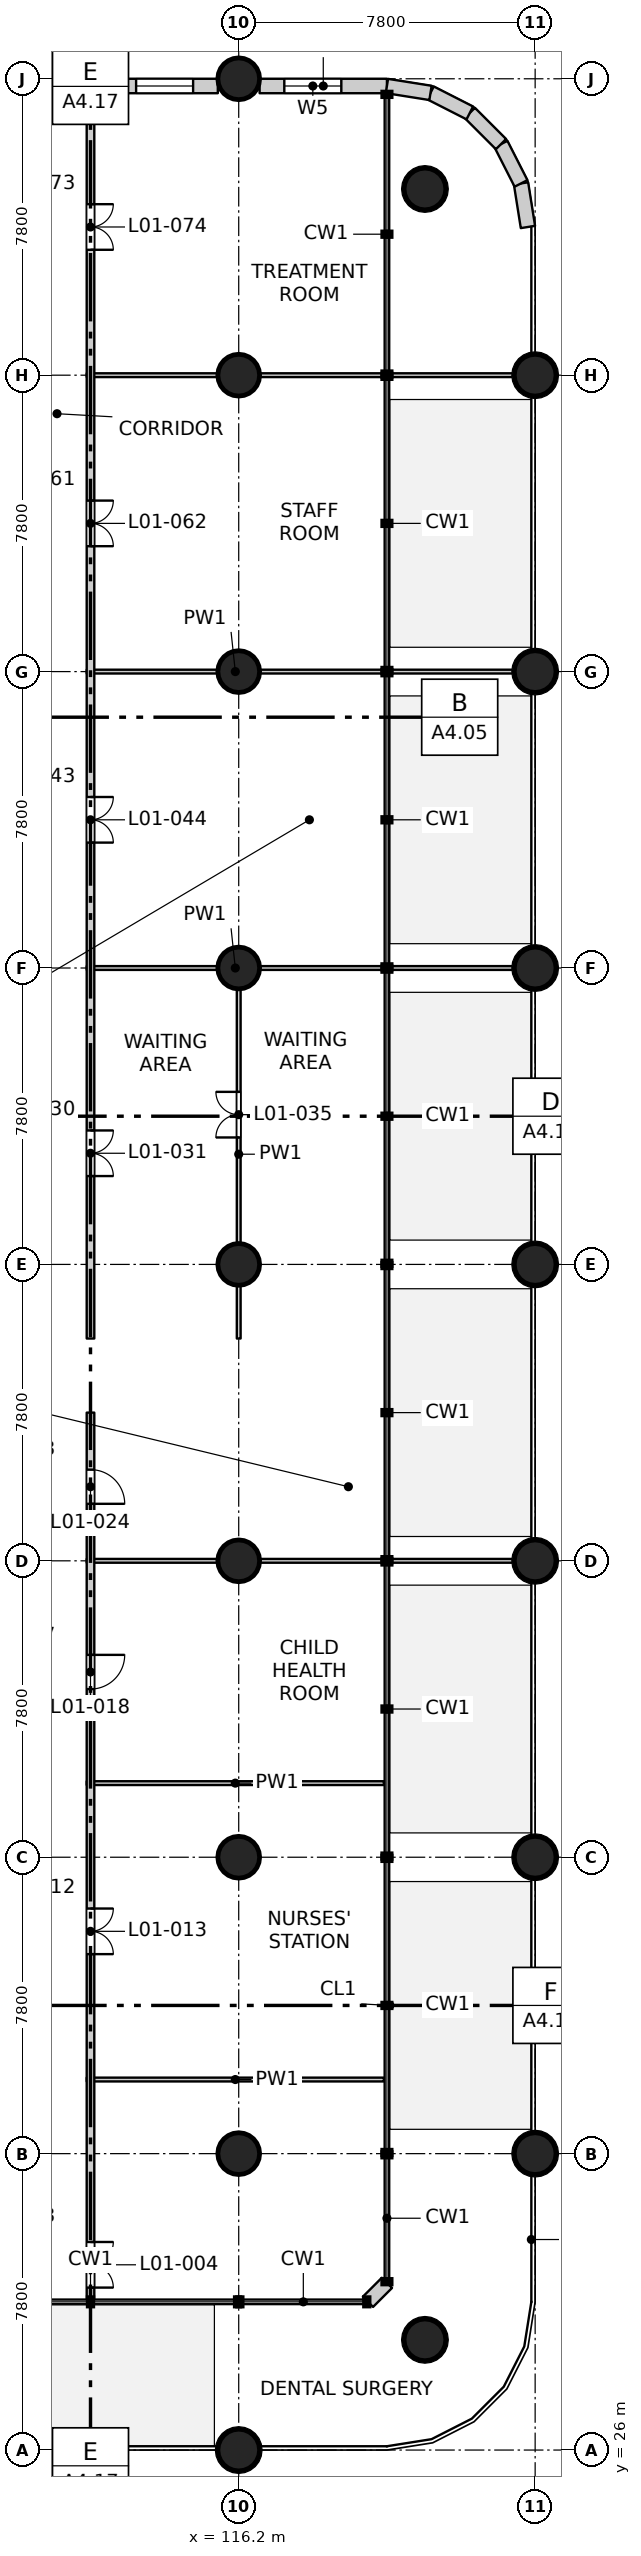
"""IFC4 building model, lengths in metres.
Left out: names, types, materials, properties, quantities, classifications, styles, units other than length and angle.
Written with IfcOpenShell. Run it as: python <this file> out.ifc"""

import sys

from ifc_helpers import new_model, si_unit, direction, frame, frame_2d, origin, origin_2d, place, context, subcontext, project, spatial, rectangle, circle, extrude, element, fill, save


model = new_model("IFC4")
c1 = context("Model", 3, precision=1e-05, world=origin(), true_north=direction((0.0, 1.0)))
c2 = subcontext(c1, "Body", "Model", "MODEL_VIEW")
j1 = project(units=[si_unit("LENGTHUNIT", "METRE"), si_unit("PLANEANGLEUNIT", "RADIAN")], contexts=[c1])
p1 = place(None, origin())
s1 = spatial("IfcSite", under=j1, at=p1, CompositionType="ELEMENT")
p2 = place(p1, origin())
s2 = spatial("IfcBuilding", under=s1, at=p2, CompositionType="ELEMENT")
p3 = place(p2, frame((0.0, 0.0, 6.0)))
s3 = spatial("IfcBuildingStorey", under=s2, at=p3, CompositionType="ELEMENT", Elevation=6.0)
for number, where, z_axis, x_axis in (
    (1, (116.2, 26.0, -0.3), (0.0, 0.0, 1.0), (1.0, 0.0, 0.0)),
    (2, (116.2, 33.8, -0.3), (0.0, 0.0, 1.0), (1.0, 0.0, 0.0)),
    (3, (116.2, 41.6, -0.3), (0.0, 0.0, 1.0), (1.0, 0.0, 0.0)),
    (4, (116.2, 49.4, -0.3), (0.0, 0.0, 1.0), (1.0, 0.0, 0.0)),
    (5, (116.2, 57.2, -0.3), (0.0, 0.0, 1.0), (1.0, 0.0, 0.0)),
    (6, (116.2, 65.0, -0.3), (0.0, 0.0, 1.0), (1.0, 0.0, 0.0)),
    (7, (116.2, 72.8, -0.3), (0.0, 0.0, 1.0), (1.0, 0.0, 0.0)),
    (8, (116.2, 80.6, -0.3), (0.0, 0.0, 1.0), (1.0, 0.0, 0.0)),
    (9, (116.2, 88.4, -0.3), (0.0, 0.0, 1.0), (1.0, 0.0, 0.0)),
    (10, (121.1, 28.9, -0.3), (0.0, 0.0, 1.0), (1.0, 0.0, 0.0)),
    (11, (124.0, 33.8, -0.3), (0.0, 0.0, 1.0), (1.0, 0.0, 0.0)),
    (12, (124.0, 41.6, -0.3), (0.0, 0.0, 1.0), (1.0, 0.0, 0.0)),
    (13, (124.0, 49.4, -0.3), (0.0, 0.0, 1.0), (1.0, 0.0, 0.0)),
    (14, (124.0, 57.2, -0.3), (0.0, 0.0, 1.0), (1.0, 0.0, 0.0)),
    (15, (124.0, 65.0, -0.3), (0.0, 0.0, 1.0), (1.0, 0.0, 0.0)),
    (16, (124.0, 72.8, -0.3), (0.0, 0.0, 1.0), (1.0, 0.0, 0.0)),
    (17, (124.0, 80.6, -0.3), (0.0, 0.0, 1.0), (1.0, 0.0, 0.0)),
    (18, (121.1, 85.5, -0.3), (0.0, 0.0, 1.0), (1.0, 0.0, 0.0)),
):
    element("IfcColumn", number, at=place(p3, frame(where, z_axis=z_axis, x_axis=x_axis)), inside=s3, PredefinedType="COLUMN", context=c2, shape_type="SweptSolid", body=[
        extrude(circle(Radius=0.55, at=origin_2d()), origin(), (0.0, 0.0, 1.0), 4.5),
    ])
p4 = place(p3, frame((119.6, 29.9, 0.0), z_axis=(0.0, 0.0, 1.0), x_axis=(0.707106781187, 0.707106781187, 0.0)))
e19 = element("IfcWall", 19, at=p4, inside=s3, PredefinedType="SOLIDWALL", context=c2, shape_type="SweptSolid", body=[
    extrude(rectangle(XDim=0.707, YDim=0.38, at=frame_2d((0.354, 0.0))), origin(), (0.0, 0.0, 1.0), 4.2),
])
p5 = place(p3, frame((101.2, 88.21, 0.0), z_axis=(0.0, 0.0, 1.0), x_axis=(1.0, 0.0, 0.0)))
e20 = element("IfcWall", 20, at=p5, inside=s3, PredefinedType="SOLIDWALL", context=c2, shape_type="SweptSolid", body=[
    extrude(rectangle(XDim=14.45, YDim=0.38, at=frame_2d((7.225, 0.0))), origin(), (0.0, 0.0, 1.0), 4.2),
])
p6 = place(p5, frame((0.6, 0.0, 0.9)))
e21 = element("IfcOpeningElement", 21, at=p6, cuts=e20, PredefinedType="OPENING", context=c2, shape_type="SweptSolid", body=[
    extrude(rectangle(XDim=1.5, YDim=1.5, at=frame_2d((0.75, 0.75))), frame((0.0, 0.2, 0.0), z_axis=(0.0, -1.0, 0.0), x_axis=(1.0, 0.0, 0.0)), (0.0, 0.0, 1.0), 0.4),
])
p7 = place(p5, frame((4.5, 0.0, 0.9)))
e22 = element("IfcOpeningElement", 22, at=p7, cuts=e20, PredefinedType="OPENING", context=c2, shape_type="SweptSolid", body=[
    extrude(rectangle(XDim=1.5, YDim=1.5, at=frame_2d((0.75, 0.75))), frame((0.0, 0.2, 0.0), z_axis=(0.0, -1.0, 0.0), x_axis=(1.0, 0.0, 0.0)), (0.0, 0.0, 1.0), 0.4),
])
p8 = place(p5, frame((12.3, 0.0, 0.9)))
e23 = element("IfcOpeningElement", 23, at=p8, cuts=e20, PredefinedType="OPENING", context=c2, shape_type="SweptSolid", body=[
    extrude(rectangle(XDim=1.5, YDim=1.5, at=frame_2d((0.75, 0.75))), frame((0.0, 0.2, 0.0), z_axis=(0.0, -1.0, 0.0), x_axis=(1.0, 0.0, 0.0)), (0.0, 0.0, 1.0), 0.4),
])
p9 = place(p3, frame((116.75, 88.21, 0.0), z_axis=(0.0, 0.0, 1.0), x_axis=(1.0, 0.0, 0.0)))
e24 = element("IfcWall", 24, at=p9, inside=s3, PredefinedType="SOLIDWALL", context=c2, shape_type="SweptSolid", body=[
    extrude(rectangle(XDim=3.35, YDim=0.38, at=frame_2d((1.675, 0.0))), origin(), (0.0, 0.0, 1.0), 4.2),
])
p10 = place(p9, frame((0.65, 0.0, 0.9)))
e25 = element("IfcOpeningElement", 25, at=p10, cuts=e24, PredefinedType="OPENING", context=c2, shape_type="SweptSolid", body=[
    extrude(rectangle(XDim=1.5, YDim=1.5, at=frame_2d((0.75, 0.75))), frame((0.0, 0.2, 0.0), z_axis=(0.0, -1.0, 0.0), x_axis=(1.0, 0.0, 0.0)), (0.0, 0.0, 1.0), 0.4),
])
p11 = place(p3, frame((123.81, 84.5, 0.0), z_axis=(0.0, 0.0, 1.0), x_axis=(-0.156480971952, 0.987680973502, 0.0)))
e26 = element("IfcWall", 26, at=p11, inside=s3, PredefinedType="SOLIDWALL", context=c2, shape_type="SweptSolid", body=[
    extrude(rectangle(XDim=1.161, YDim=0.38, at=frame_2d((0.581, 0.0))), origin(), (0.0, 0.0, 1.0), 4.2),
])
p12 = place(p3, frame((123.628, 85.646, 0.0), z_axis=(0.0, 0.0, 1.0), x_axis=(-0.453932083539, 0.891036286317, 0.0)))
e27 = element("IfcWall", 27, at=p12, inside=s3, PredefinedType="SOLIDWALL", context=c2, shape_type="SweptSolid", body=[
    extrude(rectangle(XDim=1.161, YDim=0.38, at=frame_2d((0.58, 0.0))), origin(), (0.0, 0.0, 1.0), 4.2),
])
for number, where, z_axis, x_axis in (
    (28, (123.102, 86.681, 0.0), (0.0, 0.0, 1.0), (-0.707, 0.707, 0.0)),
    (29, (122.281, 87.501, 0.0), (0.0, 0.0, 1.0), (-0.891, 0.454, 0.0)),
):
    element("IfcWall", number, at=place(p3, frame(where, z_axis=z_axis, x_axis=x_axis)), inside=s3, PredefinedType="SOLIDWALL", context=c2, shape_type="SweptSolid", body=[
        extrude(rectangle(XDim=1.161, YDim=0.38, at=frame_2d((0.581, 0.0))), origin(), (0.0, 0.0, 1.0), 4.2),
    ])
p13 = place(p3, frame((121.246, 88.028, 0.0), z_axis=(0.0, 0.0, 1.0), x_axis=(-0.987675821844, 0.156513484867, 0.0)))
e30 = element("IfcWall", 30, at=p13, inside=s3, PredefinedType="SOLIDWALL", context=c2, shape_type="SweptSolid", body=[
    extrude(rectangle(XDim=1.161, YDim=0.38, at=frame_2d((0.58, 0.0))), origin(), (0.0, 0.0, 1.0), 4.2),
])
p14 = place(p3, frame((112.2, 35.75, 0.0), z_axis=(0.0, 0.0, 1.0), x_axis=(1.0, 0.0, 0.0)))
e31 = element("IfcWall", 31, at=p14, inside=s3, PredefinedType="PARTITIONING", context=c2, shape_type="SweptSolid", body=[
    extrude(rectangle(XDim=7.82, YDim=0.1, at=frame_2d((3.91, 0.0))), origin(), (0.0, 0.0, 1.0), 4.2),
])
p15 = place(p3, frame((120.18, 35.75, 0.0), z_axis=(0.0, 0.0, 1.0), x_axis=(1.0, 0.0, 0.0)))
e32 = element("IfcWall", 32, at=p15, inside=s3, PredefinedType="PARTITIONING", context=c2, shape_type="SweptSolid", body=[
    extrude(rectangle(XDim=3.52, YDim=0.1, at=frame_2d((1.76, 0.0))), origin(), (0.0, 0.0, 1.0), 4.2),
])
p16 = place(p3, frame((112.2, 43.55, 0.0), z_axis=(0.0, 0.0, 1.0), x_axis=(1.0, 0.0, 0.0)))
e33 = element("IfcWall", 33, at=p16, inside=s3, PredefinedType="PARTITIONING", context=c2, shape_type="SweptSolid", body=[
    extrude(rectangle(XDim=7.82, YDim=0.1, at=frame_2d((3.91, 0.0))), origin(), (0.0, 0.0, 1.0), 4.2),
])
p17 = place(p3, frame((120.18, 43.55, 0.0), z_axis=(0.0, 0.0, 1.0), x_axis=(1.0, 0.0, 0.0)))
e34 = element("IfcWall", 34, at=p17, inside=s3, PredefinedType="PARTITIONING", context=c2, shape_type="SweptSolid", body=[
    extrude(rectangle(XDim=3.52, YDim=0.1, at=frame_2d((1.76, 0.0))), origin(), (0.0, 0.0, 1.0), 4.2),
])
p18 = place(p3, frame((112.2, 49.4, 0.0), z_axis=(0.0, 0.0, 1.0), x_axis=(1.0, 0.0, 0.0)))
e35 = element("IfcWall", 35, at=p18, inside=s3, PredefinedType="PARTITIONING", context=c2, shape_type="SweptSolid", body=[
    extrude(rectangle(XDim=7.82, YDim=0.1, at=frame_2d((3.91, 0.0))), origin(), (0.0, 0.0, 1.0), 4.2),
])
p19 = place(p3, frame((120.18, 49.4, 0.0), z_axis=(0.0, 0.0, 1.0), x_axis=(1.0, 0.0, 0.0)))
e36 = element("IfcWall", 36, at=p19, inside=s3, PredefinedType="PARTITIONING", context=c2, shape_type="SweptSolid", body=[
    extrude(rectangle(XDim=3.52, YDim=0.1, at=frame_2d((1.76, 0.0))), origin(), (0.0, 0.0, 1.0), 4.2),
])
p20 = place(p3, frame((112.2, 65.0, 0.0), z_axis=(0.0, 0.0, 1.0), x_axis=(1.0, 0.0, 0.0)))
e37 = element("IfcWall", 37, at=p20, inside=s3, PredefinedType="PARTITIONING", context=c2, shape_type="SweptSolid", body=[
    extrude(rectangle(XDim=7.82, YDim=0.1, at=frame_2d((3.91, 0.0))), origin(), (0.0, 0.0, 1.0), 4.2),
])
p21 = place(p3, frame((120.18, 65.0, 0.0), z_axis=(0.0, 0.0, 1.0), x_axis=(1.0, 0.0, 0.0)))
e38 = element("IfcWall", 38, at=p21, inside=s3, PredefinedType="PARTITIONING", context=c2, shape_type="SweptSolid", body=[
    extrude(rectangle(XDim=3.52, YDim=0.1, at=frame_2d((1.76, 0.0))), origin(), (0.0, 0.0, 1.0), 4.2),
])
p22 = place(p3, frame((112.2, 72.8, 0.0), z_axis=(0.0, 0.0, 1.0), x_axis=(1.0, 0.0, 0.0)))
e39 = element("IfcWall", 39, at=p22, inside=s3, PredefinedType="PARTITIONING", context=c2, shape_type="SweptSolid", body=[
    extrude(rectangle(XDim=7.82, YDim=0.1, at=frame_2d((3.91, 0.0))), origin(), (0.0, 0.0, 1.0), 4.2),
])
p23 = place(p3, frame((120.18, 72.8, 0.0), z_axis=(0.0, 0.0, 1.0), x_axis=(1.0, 0.0, 0.0)))
e40 = element("IfcWall", 40, at=p23, inside=s3, PredefinedType="PARTITIONING", context=c2, shape_type="SweptSolid", body=[
    extrude(rectangle(XDim=3.52, YDim=0.1, at=frame_2d((1.76, 0.0))), origin(), (0.0, 0.0, 1.0), 4.2),
])
p24 = place(p3, frame((112.2, 80.6, 0.0), z_axis=(0.0, 0.0, 1.0), x_axis=(1.0, 0.0, 0.0)))
e41 = element("IfcWall", 41, at=p24, inside=s3, PredefinedType="PARTITIONING", context=c2, shape_type="SweptSolid", body=[
    extrude(rectangle(XDim=7.82, YDim=0.1, at=frame_2d((3.91, 0.0))), origin(), (0.0, 0.0, 1.0), 4.2),
])
p25 = place(p3, frame((120.18, 80.6, 0.0), z_axis=(0.0, 0.0, 1.0), x_axis=(1.0, 0.0, 0.0)))
e42 = element("IfcWall", 42, at=p25, inside=s3, PredefinedType="PARTITIONING", context=c2, shape_type="SweptSolid", body=[
    extrude(rectangle(XDim=3.52, YDim=0.1, at=frame_2d((1.76, 0.0))), origin(), (0.0, 0.0, 1.0), 4.2),
])
p26 = place(p3, frame((112.3, 26.3, 0.0), z_axis=(0.0, 0.0, 1.0), x_axis=(0.0, 1.0, 0.0)))
e43 = element("IfcWall", 43, at=p26, inside=s3, PredefinedType="PARTITIONING", context=c2, shape_type="SweptSolid", body=[
    extrude(rectangle(XDim=3.52, YDim=0.2, at=frame_2d((1.76, 0.0))), origin(), (0.0, 0.0, 1.0), 4.2),
])
p27 = place(p3, frame((112.3, 29.98, 0.0), z_axis=(0.0, 0.0, 1.0), x_axis=(0.0, 1.0, 0.0)))
e44 = element("IfcWall", 44, at=p27, inside=s3, PredefinedType="PARTITIONING", context=c2, shape_type="SweptSolid", body=[
    extrude(rectangle(XDim=23.32, YDim=0.2, at=frame_2d((11.66, 0.0))), origin(), (0.0, 0.0, 1.0), 4.2),
])
p28 = place(p27, frame((0.295, 0.0, 0.0)))
e45 = element("IfcOpeningElement", 45, at=p28, cuts=e44, PredefinedType="OPENING", context=c2, shape_type="SweptSolid", body=[
    extrude(rectangle(XDim=1.2, YDim=2.1, at=frame_2d((0.6, 1.05))), frame((0.0, 0.11, 0.0), z_axis=(0.0, -1.0, 0.0), x_axis=(1.0, 0.0, 0.0)), (0.0, 0.0, 1.0), 0.22),
])
p29 = place(p27, frame((9.07, 0.0, 0.0)))
e46 = element("IfcOpeningElement", 46, at=p29, cuts=e44, PredefinedType="OPENING", context=c2, shape_type="SweptSolid", body=[
    extrude(rectangle(XDim=1.2, YDim=2.1, at=frame_2d((0.6, 1.05))), frame((0.0, 0.11, 0.0), z_axis=(0.0, -1.0, 0.0), x_axis=(1.0, 0.0, 0.0)), (0.0, 0.0, 1.0), 0.22),
])
p30 = place(p27, frame((16.045, 0.0, 0.0)))
e47 = element("IfcOpeningElement", 47, at=p30, cuts=e44, PredefinedType="OPENING", context=c2, shape_type="SweptSolid", body=[
    extrude(rectangle(XDim=0.9, YDim=2.1, at=frame_2d((0.45, 1.05))), frame((0.0, 0.11, 0.0), z_axis=(0.0, -1.0, 0.0), x_axis=(1.0, 0.0, 0.0)), (0.0, 0.0, 1.0), 0.22),
])
p31 = place(p27, frame((20.92, 0.0, 0.0)))
e48 = element("IfcOpeningElement", 48, at=p31, cuts=e44, PredefinedType="OPENING", context=c2, shape_type="SweptSolid", body=[
    extrude(rectangle(XDim=0.9, YDim=2.1, at=frame_2d((0.45, 1.05))), frame((0.0, 0.11, 0.0), z_axis=(0.0, -1.0, 0.0), x_axis=(1.0, 0.0, 0.0)), (0.0, 0.0, 1.0), 0.22),
])
p32 = place(p3, frame((112.3, 55.25, 0.0), z_axis=(0.0, 0.0, 1.0), x_axis=(0.0, 1.0, 0.0)))
e49 = element("IfcWall", 49, at=p32, inside=s3, PredefinedType="PARTITIONING", context=c2, shape_type="SweptSolid", body=[
    extrude(rectangle(XDim=32.85, YDim=0.2, at=frame_2d((16.425, 0.0))), origin(), (0.0, 0.0, 1.0), 4.2),
])
p33 = place(p32, frame((4.275, 0.0, 0.0)))
e50 = element("IfcOpeningElement", 50, at=p33, cuts=e49, PredefinedType="OPENING", context=c2, shape_type="SweptSolid", body=[
    extrude(rectangle(XDim=1.2, YDim=2.1, at=frame_2d((0.6, 1.05))), frame((0.0, 0.11, 0.0), z_axis=(0.0, -1.0, 0.0), x_axis=(1.0, 0.0, 0.0)), (0.0, 0.0, 1.0), 0.22),
])
p34 = place(p32, frame((13.05, 0.0, 0.0)))
e51 = element("IfcOpeningElement", 51, at=p34, cuts=e49, PredefinedType="OPENING", context=c2, shape_type="SweptSolid", body=[
    extrude(rectangle(XDim=1.2, YDim=2.1, at=frame_2d((0.6, 1.05))), frame((0.0, 0.11, 0.0), z_axis=(0.0, -1.0, 0.0), x_axis=(1.0, 0.0, 0.0)), (0.0, 0.0, 1.0), 0.22),
])
p35 = place(p32, frame((20.85, 0.0, 0.0)))
e52 = element("IfcOpeningElement", 52, at=p35, cuts=e49, PredefinedType="OPENING", context=c2, shape_type="SweptSolid", body=[
    extrude(rectangle(XDim=1.2, YDim=2.1, at=frame_2d((0.6, 1.05))), frame((0.0, 0.11, 0.0), z_axis=(0.0, -1.0, 0.0), x_axis=(1.0, 0.0, 0.0)), (0.0, 0.0, 1.0), 0.22),
])
p36 = place(p32, frame((28.65, 0.0, 0.0)))
e53 = element("IfcOpeningElement", 53, at=p36, cuts=e49, PredefinedType="OPENING", context=c2, shape_type="SweptSolid", body=[
    extrude(rectangle(XDim=1.2, YDim=2.1, at=frame_2d((0.6, 1.05))), frame((0.0, 0.11, 0.0), z_axis=(0.0, -1.0, 0.0), x_axis=(1.0, 0.0, 0.0)), (0.0, 0.0, 1.0), 0.22),
])
p37 = place(p3, frame((116.2, 55.25, 0.0), z_axis=(0.0, 0.0, 1.0), x_axis=(0.0, 1.0, 0.0)))
e54 = element("IfcWall", 54, at=p37, inside=s3, PredefinedType="PARTITIONING", context=c2, shape_type="SweptSolid", body=[
    extrude(rectangle(XDim=9.7, YDim=0.1, at=frame_2d((4.85, 0.0))), origin(), (0.0, 0.0, 1.0), 4.2),
])
p38 = place(p37, frame((5.291, 0.0, 0.0)))
e55 = element("IfcOpeningElement", 55, at=p38, cuts=e54, PredefinedType="OPENING", context=c2, shape_type="SweptSolid", body=[
    extrude(rectangle(XDim=1.2, YDim=2.1, at=frame_2d((0.6, 1.05))), frame((0.0, 0.06, 0.0), z_axis=(0.0, -1.0, 0.0), x_axis=(1.0, 0.0, 0.0)), (0.0, 0.0, 1.0), 0.12),
])
p39 = place(p8, origin())
e56 = element("IfcWindow", 56, at=p39, inside=s3, PartitioningType="SINGLE_PANEL", PredefinedType="WINDOW", context=c2, shape_type="SweptSolid", body=[
    extrude(rectangle(XDim=1.5, YDim=1.5, at=frame_2d((0.75, 0.75))), frame((0.0, 0.03, 0.0), z_axis=(0.0, -1.0, 0.0), x_axis=(1.0, 0.0, 0.0)), (0.0, 0.0, 1.0), 0.06),
])
fill(e23, e56)
p40 = place(p10, origin())
e57 = element("IfcWindow", 57, at=p40, inside=s3, PartitioningType="SINGLE_PANEL", PredefinedType="WINDOW", context=c2, shape_type="SweptSolid", body=[
    extrude(rectangle(XDim=1.5, YDim=1.5, at=frame_2d((0.75, 0.75))), frame((0.0, 0.03, 0.0), z_axis=(0.0, -1.0, 0.0), x_axis=(1.0, 0.0, 0.0)), (0.0, 0.0, 1.0), 0.06),
])
fill(e25, e57)
p41 = place(p28, origin())
e58 = element("IfcDoor", 58, at=p41, inside=s3, OperationType="DOUBLE_DOOR_SINGLE_SWING", PredefinedType="DOOR", context=c2, shape_type="SweptSolid", body=[
    extrude(rectangle(XDim=1.2, YDim=2.1, at=frame_2d((0.6, 1.05))), frame((0.0, 0.025, 0.0), z_axis=(0.0, -1.0, 0.0), x_axis=(1.0, 0.0, 0.0)), (0.0, 0.0, 1.0), 0.05),
])
fill(e45, e58)
p42 = place(p29, origin())
e59 = element("IfcDoor", 59, at=p42, inside=s3, OperationType="DOUBLE_DOOR_SINGLE_SWING", PredefinedType="DOOR", context=c2, shape_type="SweptSolid", body=[
    extrude(rectangle(XDim=1.2, YDim=2.1, at=frame_2d((0.6, 1.05))), frame((0.0, 0.025, 0.0), z_axis=(0.0, -1.0, 0.0), x_axis=(1.0, 0.0, 0.0)), (0.0, 0.0, 1.0), 0.05),
])
fill(e46, e59)
p43 = place(p30, origin())
e60 = element("IfcDoor", 60, at=p43, inside=s3, OperationType="SINGLE_SWING_LEFT", PredefinedType="DOOR", context=c2, shape_type="SweptSolid", body=[
    extrude(rectangle(XDim=0.9, YDim=2.1, at=frame_2d((0.45, 1.05))), frame((0.0, 0.025, 0.0), z_axis=(0.0, -1.0, 0.0), x_axis=(1.0, 0.0, 0.0)), (0.0, 0.0, 1.0), 0.05),
])
fill(e47, e60)
p44 = place(p31, origin())
e61 = element("IfcDoor", 61, at=p44, inside=s3, OperationType="SINGLE_SWING_RIGHT", PredefinedType="DOOR", context=c2, shape_type="SweptSolid", body=[
    extrude(rectangle(XDim=0.9, YDim=2.1, at=frame_2d((0.45, 1.05))), frame((0.0, 0.025, 0.0), z_axis=(0.0, -1.0, 0.0), x_axis=(1.0, 0.0, 0.0)), (0.0, 0.0, 1.0), 0.05),
])
fill(e48, e61)
p45 = place(p33, origin())
e62 = element("IfcDoor", 62, at=p45, inside=s3, OperationType="DOUBLE_DOOR_SINGLE_SWING", PredefinedType="DOOR", context=c2, shape_type="SweptSolid", body=[
    extrude(rectangle(XDim=1.2, YDim=2.1, at=frame_2d((0.6, 1.05))), frame((0.0, 0.025, 0.0), z_axis=(0.0, -1.0, 0.0), x_axis=(1.0, 0.0, 0.0)), (0.0, 0.0, 1.0), 0.05),
])
fill(e50, e62)
p46 = place(p38, origin())
e63 = element("IfcDoor", 63, at=p46, inside=s3, OperationType="DOUBLE_DOOR_SINGLE_SWING", PredefinedType="DOOR", context=c2, shape_type="SweptSolid", body=[
    extrude(rectangle(XDim=1.2, YDim=2.1, at=frame_2d((0.6, 1.05))), frame((0.0, 0.025, 0.0), z_axis=(0.0, -1.0, 0.0), x_axis=(1.0, 0.0, 0.0)), (0.0, 0.0, 1.0), 0.05),
])
fill(e55, e63)
p47 = place(p34, origin())
e64 = element("IfcDoor", 64, at=p47, inside=s3, OperationType="DOUBLE_DOOR_SINGLE_SWING", PredefinedType="DOOR", context=c2, shape_type="SweptSolid", body=[
    extrude(rectangle(XDim=1.2, YDim=2.1, at=frame_2d((0.6, 1.05))), frame((0.0, 0.025, 0.0), z_axis=(0.0, -1.0, 0.0), x_axis=(1.0, 0.0, 0.0)), (0.0, 0.0, 1.0), 0.05),
])
fill(e51, e64)
p48 = place(p35, origin())
e65 = element("IfcDoor", 65, at=p48, inside=s3, OperationType="DOUBLE_DOOR_SINGLE_SWING", PredefinedType="DOOR", context=c2, shape_type="SweptSolid", body=[
    extrude(rectangle(XDim=1.2, YDim=2.1, at=frame_2d((0.6, 1.05))), frame((0.0, 0.025, 0.0), z_axis=(0.0, -1.0, 0.0), x_axis=(1.0, 0.0, 0.0)), (0.0, 0.0, 1.0), 0.05),
])
fill(e52, e65)
p49 = place(p36, origin())
e66 = element("IfcDoor", 66, at=p49, inside=s3, OperationType="DOUBLE_DOOR_SINGLE_SWING", PredefinedType="DOOR", context=c2, shape_type="SweptSolid", body=[
    extrude(rectangle(XDim=1.2, YDim=2.1, at=frame_2d((0.6, 1.05))), frame((0.0, 0.025, 0.0), z_axis=(0.0, -1.0, 0.0), x_axis=(1.0, 0.0, 0.0)), (0.0, 0.0, 1.0), 0.05),
])
fill(e53, e66)
save(model, sys.argv[1])
